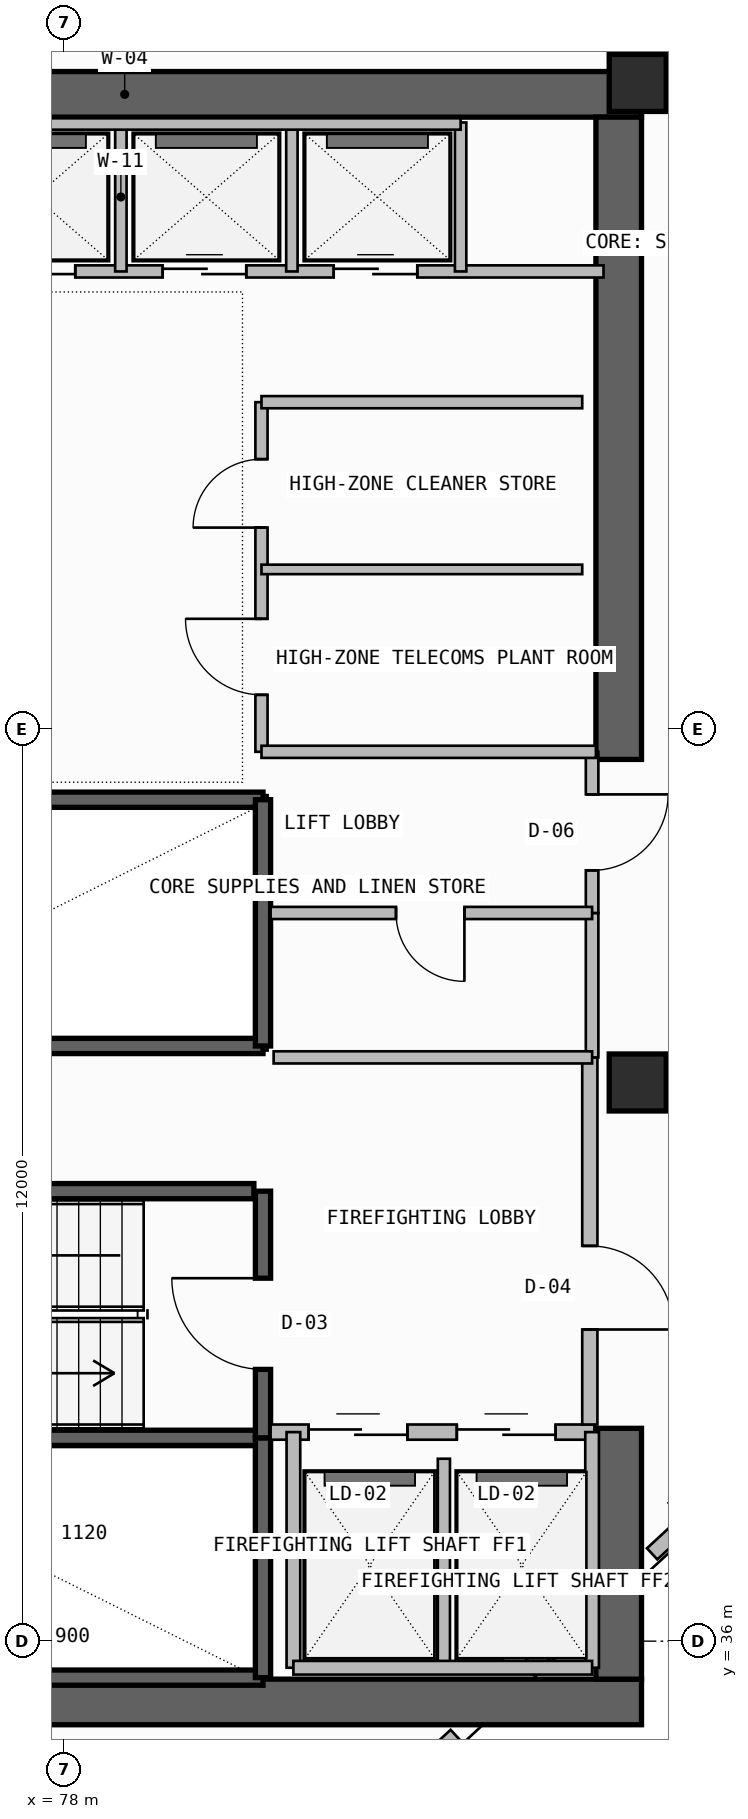
"""IFC4 building model, lengths in metres.
Left out: names, types, materials, properties, quantities, classifications, styles, units other than length and angle.
Written with IfcOpenShell. Run it as: python <this file> out.ifc"""

import sys

from ifc_helpers import new_model, si_unit, direction, frame, frame_2d, origin, origin_2d, place, context, subcontext, project, spatial, rectangle, extrude, element, fill, save


model = new_model("IFC4")
c1 = context("Model", 3, precision=1e-05, world=origin(), true_north=direction((0.0, 1.0)))
c2 = subcontext(c1, "Body", "Model", "MODEL_VIEW")
j1 = project(units=[si_unit("LENGTHUNIT", "METRE"), si_unit("PLANEANGLEUNIT", "RADIAN")], contexts=[c1])
p1 = place(None, origin())
s1 = spatial("IfcSite", under=j1, at=p1, CompositionType="ELEMENT")
p2 = place(p1, origin())
s2 = spatial("IfcBuilding", under=s1, at=p2, CompositionType="ELEMENT")
p3 = place(p2, frame((0.0, 0.0, 264.26)))
s3 = spatial("IfcBuildingStorey", under=s2, at=p3, CompositionType="ELEMENT", Elevation=264.26)
p4 = place(p3, frame((72.3, 35.2, -0.26), z_axis=(0.0, 0.0, 1.0), x_axis=(1.0, 0.0, 0.0)))
e1 = element("IfcWall", 1, at=p4, inside=s3, PredefinedType="SHEAR", context=c2, shape_type="SweptSolid", body=[
    extrude(rectangle(XDim=13.3, YDim=0.6, at=frame_2d((6.65, 0.0))), origin(), (0.0, 0.0, 1.0), 3.52),
])
p5 = place(p3, frame((85.3, 35.5, -0.26), z_axis=(0.0, 0.0, 1.0), x_axis=(0.0, 1.0, 0.0)))
e2 = element("IfcWall", 2, at=p5, inside=s3, PredefinedType="SHEAR", context=c2, shape_type="SweptSolid", body=[
    extrude(rectangle(XDim=3.3, YDim=0.6, at=frame_2d((1.65, 0.0))), origin(), (0.0, 0.0, 1.0), 3.52),
])
p6 = place(p3, frame((72.0, 56.35, -0.26), z_axis=(0.0, 0.0, 1.0), x_axis=(1.0, 0.0, 0.0)))
e3 = element("IfcWall", 3, at=p6, inside=s3, PredefinedType="SHEAR", context=c2, shape_type="SweptSolid", body=[
    extrude(rectangle(XDim=13.6, YDim=0.6, at=frame_2d((6.8, 0.0))), origin(), (0.0, 0.0, 1.0), 3.52),
])
p7 = place(p3, frame((85.3, 47.6, -0.26), z_axis=(0.0, 0.0, 1.0), x_axis=(0.0, 1.0, 0.0)))
e4 = element("IfcWall", 4, at=p7, inside=s3, PredefinedType="SHEAR", context=c2, shape_type="SweptSolid", body=[
    extrude(rectangle(XDim=8.45, YDim=0.6, at=frame_2d((4.225, 0.0))), origin(), (0.0, 0.0, 1.0), 3.52),
])
for number, where, z_axis, x_axis in (
    (5, (85.55, 43.35, 0.0), (0.0, 0.0, 1.0), (1.0, 0.0, 0.0)),
    (6, (85.55, 56.5, 0.0), (0.0, 0.0, 1.0), (1.0, 0.0, 0.0)),
):
    element("IfcColumn", number, at=place(p3, frame(where, z_axis=z_axis, x_axis=x_axis)), inside=s3, PredefinedType="COLUMN", context=c2, shape_type="SweptSolid", body=[
        extrude(rectangle(XDim=0.75, YDim=0.75, at=origin_2d()), origin(), (0.0, 0.0, 1.0), 3.52),
    ])
p8 = place(p3, frame((86.192, 37.566, 0.0), z_axis=(0.0, 0.0, 1.0), x_axis=(-0.734346728958, -0.678774544064, 0.0)))
e7 = element("IfcWall", 7, at=p8, inside=s3, PredefinedType="PARAPET", context=c2, shape_type="SweptSolid", body=[
    extrude(rectangle(XDim=0.615, YDim=0.2, at=frame_2d((0.308, 0.0))), origin(), (0.0, 0.0, 1.0), 1.15),
])
p9 = place(p3, frame((84.86, 36.335, 0.0), z_axis=(0.0, 0.0, 1.0), x_axis=(-0.734337093013, -0.678784968768, 0.0)))
e8 = element("IfcWall", 8, at=p9, inside=s3, PredefinedType="PARAPET", context=c2, shape_type="SweptSolid", body=[
    extrude(rectangle(XDim=1.024, YDim=0.2, at=frame_2d((0.512, 0.0))), origin(), (0.0, 0.0, 1.0), 1.15),
])
p10 = place(p3, frame((83.156, 34.76, 0.0), z_axis=(0.0, 0.0, 1.0), x_axis=(-0.734364355784, -0.678755473609, 0.0)))
e9 = element("IfcWall", 9, at=p10, inside=s3, PredefinedType="PARAPET", context=c2, shape_type="SweptSolid", body=[
    extrude(rectangle(XDim=1.045, YDim=0.2, at=frame_2d((0.522, 0.0))), origin(), (0.0, 0.0, 1.0), 1.15),
])
for number, where, z_axis, x_axis in (
    (10, (72.92, 35.52, -0.26), (0.0, 0.0, 1.0), (1.0, 0.0, 0.0)),
    (11, (72.92, 38.675, -0.26), (0.0, 0.0, 1.0), (1.0, 0.0, 0.0)),
):
    element("IfcWall", number, at=place(p3, frame(where, z_axis=z_axis, x_axis=x_axis)), inside=s3, PredefinedType="SOLIDWALL", context=c2, shape_type="SweptSolid", body=[
        extrude(rectangle(XDim=7.7, YDim=0.2, at=frame_2d((3.85, 0.0))), origin(), (0.0, 0.0, 1.0), 3.52),
    ])
p11 = place(p3, frame((80.62, 35.52, -0.26), z_axis=(0.0, 0.0, 1.0), x_axis=(0.0, 1.0, 0.0)))
e12 = element("IfcWall", 12, at=p11, inside=s3, PredefinedType="SOLIDWALL", context=c2, shape_type="SweptSolid", body=[
    extrude(rectangle(XDim=3.155, YDim=0.2, at=frame_2d((1.578, 0.0))), origin(), (0.0, 0.0, 1.0), 3.52),
])
p12 = place(p3, frame((80.62, 38.675, -0.26), z_axis=(0.0, 0.0, 1.0), x_axis=(0.0, 1.0, 0.0)))
e13 = element("IfcWall", 13, at=p12, inside=s3, PredefinedType="SOLIDWALL", context=c2, shape_type="SweptSolid", body=[
    extrude(rectangle(XDim=3.245, YDim=0.2, at=frame_2d((1.623, 0.0))), origin(), (0.0, 0.0, 1.0), 3.52),
])
p13 = place(p12, frame((0.9, 0.0, 0.26)))
e14 = element("IfcOpeningElement", 14, at=p13, cuts=e13, PredefinedType="OPENING", context=c2, shape_type="SweptSolid", body=[
    extrude(rectangle(XDim=1.2, YDim=2.2, at=frame_2d((0.6, 1.1))), frame((0.0, 0.11, 0.0), z_axis=(0.0, -1.0, 0.0), x_axis=(1.0, 0.0, 0.0)), (0.0, 0.0, 1.0), 0.22),
])
p14 = place(p3, frame((80.72, 38.75, 0.0), z_axis=(0.0, 0.0, 1.0), x_axis=(1.0, 0.0, 0.0)))
e15 = element("IfcWall", 15, at=p14, inside=s3, PredefinedType="SOLIDWALL", context=c2, shape_type="SweptSolid", body=[
    extrude(rectangle(XDim=4.26, YDim=0.2, at=frame_2d((2.13, 0.0))), origin(), (0.0, 0.0, 1.0), 3.26),
])
p15 = place(p14, frame((0.5, 0.0, 0.0)))
e16 = element("IfcOpeningElement", 16, at=p15, cuts=e15, PredefinedType="OPENING", context=c2, shape_type="SweptSolid", body=[
    extrude(rectangle(XDim=1.3, YDim=2.3, at=frame_2d((0.65, 1.15))), frame((0.0, 0.11, 0.0), z_axis=(0.0, -1.0, 0.0), x_axis=(1.0, 0.0, 0.0)), (0.0, 0.0, 1.0), 0.22),
])
p16 = place(p14, frame((2.45, 0.0, 0.0)))
e17 = element("IfcOpeningElement", 17, at=p16, cuts=e15, PredefinedType="OPENING", context=c2, shape_type="SweptSolid", body=[
    extrude(rectangle(XDim=1.3, YDim=2.3, at=frame_2d((0.65, 1.15))), frame((0.0, 0.11, 0.0), z_axis=(0.0, -1.0, 0.0), x_axis=(1.0, 0.0, 0.0)), (0.0, 0.0, 1.0), 0.22),
])
p17 = place(p3, frame((83.0, 35.65, 0.0), z_axis=(0.0, 0.0, 1.0), x_axis=(0.0, 1.0, 0.0)))
e18 = element("IfcWall", 18, at=p17, inside=s3, PredefinedType="PLUMBINGWALL", context=c2, shape_type="SweptSolid", body=[
    extrude(rectangle(XDim=2.75, YDim=0.16, at=frame_2d((1.375, 0.0))), origin(), (0.0, 0.0, 1.0), 3.26),
])
for number, where, z_axis, x_axis in (
    (19, (84.95, 35.65, 0.0), (0.0, 0.0, 1.0), (0.0, 1.0, 0.0)),
    (20, (81.02, 35.65, 0.0), (0.0, 0.0, 1.0), (0.0, 1.0, 0.0)),
):
    element("IfcWall", number, at=place(p3, frame(where, z_axis=z_axis, x_axis=x_axis)), inside=s3, PredefinedType="SOLIDWALL", context=c2, shape_type="SweptSolid", body=[
        extrude(rectangle(XDim=3.1, YDim=0.18, at=frame_2d((1.55, 0.0))), origin(), (0.0, 0.0, 1.0), 3.26),
    ])
p18 = place(p3, frame((81.02, 35.65, 0.0), z_axis=(0.0, 0.0, 1.0), x_axis=(1.0, 0.0, 0.0)))
e21 = element("IfcWall", 21, at=p18, inside=s3, PredefinedType="SOLIDWALL", context=c2, shape_type="SweptSolid", body=[
    extrude(rectangle(XDim=3.93, YDim=0.18, at=frame_2d((1.965, 0.0))), origin(), (0.0, 0.0, 1.0), 3.26),
])
p19 = place(p3, frame((84.92, 38.85, 0.0), z_axis=(0.0, 0.0, 1.0), x_axis=(0.0, 1.0, 0.0)))
e22 = element("IfcWall", 22, at=p19, inside=s3, PredefinedType="SOLIDWALL", context=c2, shape_type="SweptSolid", body=[
    extrude(rectangle(XDim=4.83, YDim=0.2, at=frame_2d((2.415, 0.0))), origin(), (0.0, 0.0, 1.0), 3.26),
])
p20 = place(p19, frame((1.25, 0.0, 0.0)))
e23 = element("IfcOpeningElement", 23, at=p20, cuts=e22, PredefinedType="OPENING", context=c2, shape_type="SweptSolid", body=[
    extrude(rectangle(XDim=1.1, YDim=2.2, at=frame_2d((0.55, 1.1))), frame((0.0, 0.11, 0.0), z_axis=(0.0, -1.0, 0.0), x_axis=(1.0, 0.0, 0.0)), (0.0, 0.0, 1.0), 0.22),
])
p21 = place(p3, frame((72.92, 41.92, -0.26), z_axis=(0.0, 0.0, 1.0), x_axis=(1.0, 0.0, 0.0)))
e24 = element("IfcWall", 24, at=p21, inside=s3, PredefinedType="SOLIDWALL", context=c2, shape_type="SweptSolid", body=[
    extrude(rectangle(XDim=7.58, YDim=0.2, at=frame_2d((3.79, 0.0))), origin(), (0.0, 0.0, 1.0), 3.52),
])
for number, where, z_axis, x_axis in (
    (25, (72.92, 43.83, -0.26), (0.0, 0.0, 1.0), (1.0, 0.0, 0.0)),
    (26, (72.92, 47.07, -0.26), (0.0, 0.0, 1.0), (1.0, 0.0, 0.0)),
):
    element("IfcWall", number, at=place(p3, frame(where, z_axis=z_axis, x_axis=x_axis)), inside=s3, PredefinedType="SOLIDWALL", context=c2, shape_type="SweptSolid", body=[
        extrude(rectangle(XDim=7.7, YDim=0.2, at=frame_2d((3.85, 0.0))), origin(), (0.0, 0.0, 1.0), 3.52),
    ])
p22 = place(p3, frame((80.62, 43.83, -0.26), z_axis=(0.0, 0.0, 1.0), x_axis=(0.0, 1.0, 0.0)))
e27 = element("IfcWall", 27, at=p22, inside=s3, PredefinedType="SOLIDWALL", context=c2, shape_type="SweptSolid", body=[
    extrude(rectangle(XDim=3.24, YDim=0.2, at=frame_2d((1.62, 0.0))), origin(), (0.0, 0.0, 1.0), 3.52),
])
p23 = place(p3, frame((84.95, 43.68, 0.0), z_axis=(0.0, 0.0, 1.0), x_axis=(0.0, 1.0, 0.0)))
e28 = element("IfcWall", 28, at=p23, inside=s3, PredefinedType="PLUMBINGWALL", context=c2, shape_type="SweptSolid", body=[
    extrude(rectangle(XDim=1.9, YDim=0.165, at=frame_2d((0.95, 0.0))), origin(), (0.0, 0.0, 1.0), 3.26),
])
p24 = place(p3, frame((84.95, 45.58, 0.0), z_axis=(0.0, 0.0, 1.0), x_axis=(0.0, 1.0, 0.0)))
e29 = element("IfcWall", 29, at=p24, inside=s3, PredefinedType="PARTITIONING", context=c2, shape_type="SweptSolid", body=[
    extrude(rectangle(XDim=2.12, YDim=0.165, at=frame_2d((1.06, 0.0))), origin(), (0.0, 0.0, 1.0), 3.26),
])
p25 = place(p24, frame((0.56, 0.0, 0.0)))
e30 = element("IfcOpeningElement", 30, at=p25, cuts=e29, PredefinedType="OPENING", context=c2, shape_type="SweptSolid", body=[
    extrude(rectangle(XDim=1.0, YDim=2.2, at=frame_2d((0.5, 1.1))), frame((0.0, 0.093, 0.0), z_axis=(0.0, -1.0, 0.0), x_axis=(1.0, 0.0, 0.0)), (0.0, 0.0, 1.0), 0.185),
])
p26 = place(p3, frame((80.72, 45.58, 0.0), z_axis=(0.0, 0.0, 1.0), x_axis=(1.0, 0.0, 0.0)))
e31 = element("IfcWall", 31, at=p26, inside=s3, PredefinedType="PLUMBINGWALL", context=c2, shape_type="SweptSolid", body=[
    extrude(rectangle(XDim=4.23, YDim=0.16, at=frame_2d((2.115, 0.0))), origin(), (0.0, 0.0, 1.0), 3.26),
])
p27 = place(p26, frame((1.65, 0.0, 0.0)))
e32 = element("IfcOpeningElement", 32, at=p27, cuts=e31, PredefinedType="OPENING", context=c2, shape_type="SweptSolid", body=[
    extrude(rectangle(XDim=0.9, YDim=2.1, at=frame_2d((0.45, 1.05))), frame((0.0, 0.09, 0.0), z_axis=(0.0, -1.0, 0.0), x_axis=(1.0, 0.0, 0.0)), (0.0, 0.0, 1.0), 0.18),
])
p28 = place(p3, frame((80.76, 43.68, 0.0), z_axis=(0.0, 0.0, 1.0), x_axis=(1.0, 0.0, 0.0)))
e33 = element("IfcWall", 33, at=p28, inside=s3, PredefinedType="PLUMBINGWALL", context=c2, shape_type="SweptSolid", body=[
    extrude(rectangle(XDim=4.19, YDim=0.16, at=frame_2d((2.095, 0.0))), origin(), (0.0, 0.0, 1.0), 3.26),
])
p29 = place(p3, frame((80.6, 47.7, 0.0), z_axis=(0.0, 0.0, 1.0), x_axis=(0.0, 1.0, 0.0)))
e34 = element("IfcWall", 34, at=p29, inside=s3, PredefinedType="SOLIDWALL", context=c2, shape_type="SweptSolid", body=[
    extrude(rectangle(XDim=4.6, YDim=0.16, at=frame_2d((2.3, 0.0))), origin(), (0.0, 0.0, 1.0), 3.26),
])
p30 = place(p29, frame((0.75, 0.0, 0.0)))
e35 = element("IfcOpeningElement", 35, at=p30, cuts=e34, PredefinedType="OPENING", context=c2, shape_type="SweptSolid", body=[
    extrude(rectangle(XDim=1.0, YDim=2.2, at=frame_2d((0.5, 1.1))), frame((0.0, 0.09, 0.0), z_axis=(0.0, -1.0, 0.0), x_axis=(1.0, 0.0, 0.0)), (0.0, 0.0, 1.0), 0.18),
])
p31 = place(p29, frame((2.95, 0.0, 0.0)))
e36 = element("IfcOpeningElement", 36, at=p31, cuts=e34, PredefinedType="OPENING", context=c2, shape_type="SweptSolid", body=[
    extrude(rectangle(XDim=0.9, YDim=2.1, at=frame_2d((0.45, 1.05))), frame((0.0, 0.09, 0.0), z_axis=(0.0, -1.0, 0.0), x_axis=(1.0, 0.0, 0.0)), (0.0, 0.0, 1.0), 0.18),
])
p32 = place(p3, frame((80.6, 47.7, 0.0), z_axis=(0.0, 0.0, 1.0), x_axis=(1.0, 0.0, 0.0)))
e37 = element("IfcWall", 37, at=p32, inside=s3, PredefinedType="SOLIDWALL", context=c2, shape_type="SweptSolid", body=[
    extrude(rectangle(XDim=4.4, YDim=0.16, at=frame_2d((2.2, 0.0))), origin(), (0.0, 0.0, 1.0), 3.26),
])
p33 = place(p3, frame((80.6, 52.3, 0.0), z_axis=(0.0, 0.0, 1.0), x_axis=(1.0, 0.0, 0.0)))
e38 = element("IfcWall", 38, at=p33, inside=s3, PredefinedType="SOLIDWALL", context=c2, shape_type="SweptSolid", body=[
    extrude(rectangle(XDim=4.22, YDim=0.16, at=frame_2d((2.11, 0.0))), origin(), (0.0, 0.0, 1.0), 3.26),
])
p34 = place(p3, frame((80.6, 50.1, 0.0), z_axis=(0.0, 0.0, 1.0), x_axis=(1.0, 0.0, 0.0)))
e39 = element("IfcWall", 39, at=p34, inside=s3, PredefinedType="PARTITIONING", context=c2, shape_type="SweptSolid", body=[
    extrude(rectangle(XDim=4.22, YDim=0.125, at=frame_2d((2.11, 0.0))), origin(), (0.0, 0.0, 1.0), 3.26),
])
p35 = place(p3, frame((73.02, 54.02, 0.0), z_axis=(0.0, 0.0, 1.0), x_axis=(1.0, 0.0, 0.0)))
e40 = element("IfcWall", 40, at=p35, inside=s3, PredefinedType="SOLIDWALL", context=c2, shape_type="SweptSolid", body=[
    extrude(rectangle(XDim=12.08, YDim=0.16, at=frame_2d((6.04, 0.0))), origin(), (0.0, 0.0, 1.0), 3.26),
])
p36 = place(p35, frame((4.03, 0.0, 0.0)))
e41 = element("IfcOpeningElement", 41, at=p36, cuts=e40, PredefinedType="OPENING", context=c2, shape_type="SweptSolid", body=[
    extrude(rectangle(XDim=1.1, YDim=2.25, at=frame_2d((0.55, 1.125))), frame((0.0, 0.09, 0.0), z_axis=(0.0, -1.0, 0.0), x_axis=(1.0, 0.0, 0.0)), (0.0, 0.0, 1.0), 0.18),
])
p37 = place(p35, frame((6.28, 0.0, 0.0)))
e42 = element("IfcOpeningElement", 42, at=p37, cuts=e40, PredefinedType="OPENING", context=c2, shape_type="SweptSolid", body=[
    extrude(rectangle(XDim=1.1, YDim=2.25, at=frame_2d((0.55, 1.125))), frame((0.0, 0.09, 0.0), z_axis=(0.0, -1.0, 0.0), x_axis=(1.0, 0.0, 0.0)), (0.0, 0.0, 1.0), 0.18),
])
p38 = place(p35, frame((8.53, 0.0, 0.0)))
e43 = element("IfcOpeningElement", 43, at=p38, cuts=e40, PredefinedType="OPENING", context=c2, shape_type="SweptSolid", body=[
    extrude(rectangle(XDim=1.1, YDim=2.25, at=frame_2d((0.55, 1.125))), frame((0.0, 0.09, 0.0), z_axis=(0.0, -1.0, 0.0), x_axis=(1.0, 0.0, 0.0)), (0.0, 0.0, 1.0), 0.18),
])
for number, where, z_axis, x_axis in (
    (44, (78.75, 54.02, 0.0), (0.0, 0.0, 1.0), (0.0, 1.0, 0.0)),
    (45, (81.0, 54.02, 0.0), (0.0, 0.0, 1.0), (0.0, 1.0, 0.0)),
):
    element("IfcWall", number, at=place(p3, frame(where, z_axis=z_axis, x_axis=x_axis)), inside=s3, PredefinedType="PLUMBINGWALL", context=c2, shape_type="SweptSolid", body=[
        extrude(rectangle(XDim=1.96, YDim=0.15, at=frame_2d((0.98, 0.0))), origin(), (0.0, 0.0, 1.0), 3.26),
    ])
p39 = place(p3, frame((83.22, 54.02, 0.0), z_axis=(0.0, 0.0, 1.0), x_axis=(0.0, 1.0, 0.0)))
e46 = element("IfcWall", 46, at=p39, inside=s3, PredefinedType="SOLIDWALL", context=c2, shape_type="SweptSolid", body=[
    extrude(rectangle(XDim=1.96, YDim=0.15, at=frame_2d((0.98, 0.0))), origin(), (0.0, 0.0, 1.0), 3.26),
])
p40 = place(p3, frame((76.52, 55.96, 0.0), z_axis=(0.0, 0.0, 1.0), x_axis=(1.0, 0.0, 0.0)))
e47 = element("IfcWall", 47, at=p40, inside=s3, PredefinedType="SOLIDWALL", context=c2, shape_type="SweptSolid", body=[
    extrude(rectangle(XDim=6.7, YDim=0.15, at=frame_2d((3.35, 0.0))), origin(), (0.0, 0.0, 1.0), 3.26),
])
p41 = place(p13, origin())
e48 = element("IfcDoor", 48, at=p41, inside=s3, OperationType="SINGLE_SWING_RIGHT", PredefinedType="USERDEFINED", context=c2, shape_type="SweptSolid", body=[
    extrude(rectangle(XDim=1.2, YDim=2.2, at=frame_2d((0.6, 1.1))), frame((0.0, 0.025, 0.0), z_axis=(0.0, -1.0, 0.0), x_axis=(1.0, 0.0, 0.0)), (0.0, 0.0, 1.0), 0.05),
])
fill(e14, e48)
p42 = place(p15, origin())
e49 = element("IfcDoor", 49, at=p42, inside=s3, OperationType="DOUBLE_DOOR_SLIDING", PredefinedType="DOOR", context=c2, shape_type="SweptSolid", body=[
    extrude(rectangle(XDim=1.3, YDim=2.3, at=frame_2d((0.65, 1.15))), frame((0.0, 0.025, 0.0), z_axis=(0.0, -1.0, 0.0), x_axis=(1.0, 0.0, 0.0)), (0.0, 0.0, 1.0), 0.05),
])
fill(e16, e49)
p43 = place(p16, origin())
e50 = element("IfcDoor", 50, at=p43, inside=s3, OperationType="DOUBLE_DOOR_SLIDING", PredefinedType="DOOR", context=c2, shape_type="SweptSolid", body=[
    extrude(rectangle(XDim=1.3, YDim=2.3, at=frame_2d((0.65, 1.15))), frame((0.0, 0.025, 0.0), z_axis=(0.0, -1.0, 0.0), x_axis=(1.0, 0.0, 0.0)), (0.0, 0.0, 1.0), 0.05),
])
fill(e17, e50)
p44 = place(p20, frame((1.1, 0.0, 0.0), z_axis=(0.0, 0.0, 1.0), x_axis=(-1.0, 0.0, 0.0)))
e51 = element("IfcDoor", 51, at=p44, inside=s3, OperationType="SINGLE_SWING_RIGHT", PredefinedType="DOOR", context=c2, shape_type="SweptSolid", body=[
    extrude(rectangle(XDim=1.1, YDim=2.2, at=frame_2d((0.55, 1.1))), frame((0.0, 0.025, 0.0), z_axis=(0.0, -1.0, 0.0), x_axis=(1.0, 0.0, 0.0)), (0.0, 0.0, 1.0), 0.05),
])
fill(e23, e51)
p45 = place(p25, frame((1.0, 0.0, 0.0), z_axis=(0.0, 0.0, 1.0), x_axis=(-1.0, 0.0, 0.0)))
e52 = element("IfcDoor", 52, at=p45, inside=s3, OperationType="SINGLE_SWING_LEFT", PredefinedType="DOOR", context=c2, shape_type="SweptSolid", body=[
    extrude(rectangle(XDim=1.0, YDim=2.2, at=frame_2d((0.5, 1.1))), frame((0.0, 0.025, 0.0), z_axis=(0.0, -1.0, 0.0), x_axis=(1.0, 0.0, 0.0)), (0.0, 0.0, 1.0), 0.05),
])
fill(e30, e52)
p46 = place(p27, frame((0.9, 0.0, 0.0), z_axis=(0.0, 0.0, 1.0), x_axis=(-1.0, 0.0, 0.0)))
e53 = element("IfcDoor", 53, at=p46, inside=s3, OperationType="SINGLE_SWING_LEFT", PredefinedType="DOOR", context=c2, shape_type="SweptSolid", body=[
    extrude(rectangle(XDim=0.9, YDim=2.1, at=frame_2d((0.45, 1.05))), frame((0.0, 0.025, 0.0), z_axis=(0.0, -1.0, 0.0), x_axis=(1.0, 0.0, 0.0)), (0.0, 0.0, 1.0), 0.05),
])
fill(e32, e53)
p47 = place(p30, origin())
e54 = element("IfcDoor", 54, at=p47, inside=s3, OperationType="SINGLE_SWING_RIGHT", PredefinedType="DOOR", context=c2, shape_type="SweptSolid", body=[
    extrude(rectangle(XDim=1.0, YDim=2.2, at=frame_2d((0.5, 1.1))), frame((0.0, 0.025, 0.0), z_axis=(0.0, -1.0, 0.0), x_axis=(1.0, 0.0, 0.0)), (0.0, 0.0, 1.0), 0.05),
])
fill(e35, e54)
p48 = place(p31, origin())
e55 = element("IfcDoor", 55, at=p48, inside=s3, OperationType="SINGLE_SWING_LEFT", PredefinedType="DOOR", context=c2, shape_type="SweptSolid", body=[
    extrude(rectangle(XDim=0.9, YDim=2.1, at=frame_2d((0.45, 1.05))), frame((0.0, 0.025, 0.0), z_axis=(0.0, -1.0, 0.0), x_axis=(1.0, 0.0, 0.0)), (0.0, 0.0, 1.0), 0.05),
])
fill(e36, e55)
p49 = place(p36, origin())
e56 = element("IfcDoor", 56, at=p49, inside=s3, OperationType="DOUBLE_DOOR_SLIDING", PredefinedType="DOOR", context=c2, shape_type="SweptSolid", body=[
    extrude(rectangle(XDim=1.1, YDim=2.25, at=frame_2d((0.55, 1.125))), frame((0.0, 0.025, 0.0), z_axis=(0.0, -1.0, 0.0), x_axis=(1.0, 0.0, 0.0)), (0.0, 0.0, 1.0), 0.05),
])
fill(e41, e56)
p50 = place(p37, origin())
e57 = element("IfcDoor", 57, at=p50, inside=s3, OperationType="DOUBLE_DOOR_SLIDING", PredefinedType="DOOR", context=c2, shape_type="SweptSolid", body=[
    extrude(rectangle(XDim=1.1, YDim=2.25, at=frame_2d((0.55, 1.125))), frame((0.0, 0.025, 0.0), z_axis=(0.0, -1.0, 0.0), x_axis=(1.0, 0.0, 0.0)), (0.0, 0.0, 1.0), 0.05),
])
fill(e42, e57)
p51 = place(p38, origin())
e58 = element("IfcDoor", 58, at=p51, inside=s3, OperationType="DOUBLE_DOOR_SLIDING", PredefinedType="DOOR", context=c2, shape_type="SweptSolid", body=[
    extrude(rectangle(XDim=1.1, YDim=2.25, at=frame_2d((0.55, 1.125))), frame((0.0, 0.025, 0.0), z_axis=(0.0, -1.0, 0.0), x_axis=(1.0, 0.0, 0.0)), (0.0, 0.0, 1.0), 0.05),
])
fill(e43, e58)
save(model, sys.argv[1])
